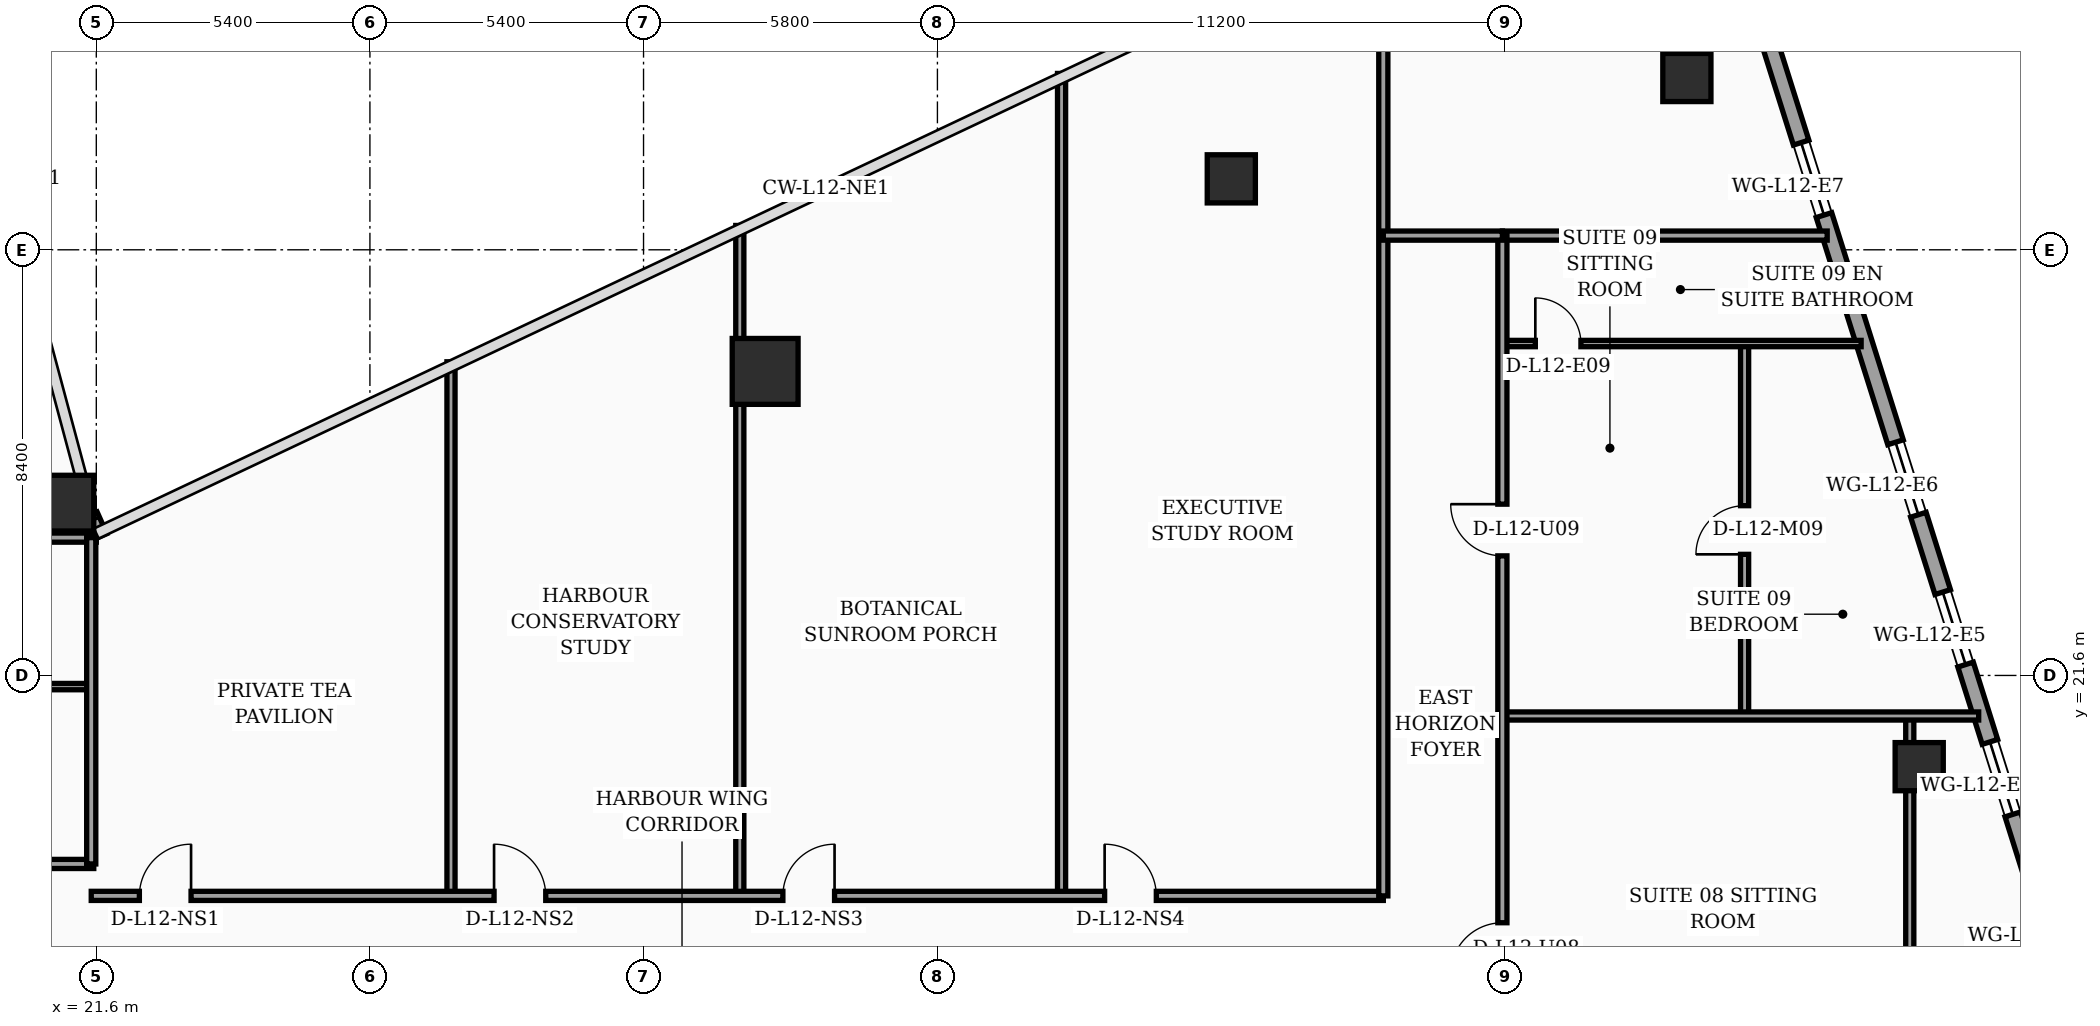
"""IFC4 building model, lengths in metres.
Left out: names, types, materials, properties, quantities, classifications, styles, units other than length and angle.
Written with IfcOpenShell. Run it as: python <this file> out.ifc"""

import sys

from ifc_helpers import new_model, si_unit, direction, frame, frame_2d, origin, origin_2d, place, context, subcontext, project, spatial, rectangle, hollow_rectangle, circle, extrude, element, fill, save


model = new_model("IFC4")
c1 = context("Model", 3, precision=1e-05, world=origin(), true_north=direction((0.0, 1.0)))
c2 = subcontext(c1, "Body", "Model", "MODEL_VIEW")
j1 = project(units=[si_unit("LENGTHUNIT", "METRE"), si_unit("PLANEANGLEUNIT", "RADIAN")], contexts=[c1])
p1 = place(None, origin())
s1 = spatial("IfcSite", under=j1, at=p1, CompositionType="ELEMENT")
p2 = place(p1, origin())
s2 = spatial("IfcBuilding", under=s1, at=p2, CompositionType="ELEMENT")
p3 = place(p2, frame((0.0, 0.0, 54.6)))
s3 = spatial("IfcBuildingStorey", under=s2, at=p3, CompositionType="ELEMENT", Elevation=54.6)
p4 = place(p3, frame((21.0, 25.0, 0.0), z_axis=(0.0, 0.0, 1.0), x_axis=(1.0, 0.0, 0.0)))
e1 = element("IfcColumn", 1, at=p4, inside=s3, PredefinedType="COLUMN", context=c2, shape_type="SweptSolid", body=[
    extrude(hollow_rectangle(XDim=1.1, YDim=1.1, WallThickness=0.045, at=origin_2d()), origin(), (0.0, 0.0, 1.0), 3.56),
])
p5 = place(p3, frame((34.8, 27.6, 0.0), z_axis=(0.0, 0.0, 1.0), x_axis=(1.0, 0.0, 0.0)))
e2 = element("IfcColumn", 2, at=p5, inside=s3, PredefinedType="COLUMN", context=c2, shape_type="SweptSolid", body=[
    extrude(circle(Radius=0.65, at=origin_2d()), origin(), (0.0, 0.0, 1.0), 3.56),
])
for number, where, z_axis, x_axis in (
    (3, (44.0, 31.4, 0.0), (0.0, 0.0, 1.0), (1.0, 0.0, 0.0)),
    (4, (57.576, 19.8, 0.0), (0.0, 0.0, 1.0), (1.0, 0.0, 0.0)),
    (5, (52.991, 33.4, 0.0), (0.0, 0.0, 1.0), (1.0, 0.0, 0.0)),
):
    element("IfcColumn", number, at=place(p3, frame(where, z_axis=z_axis, x_axis=x_axis)), inside=s3, PredefinedType="COLUMN", context=c2, shape_type="SweptSolid", body=[
        extrude(hollow_rectangle(XDim=0.95, YDim=0.95, WallThickness=0.04, at=origin_2d()), origin(), (0.0, 0.0, 1.0), 3.56),
    ])
p6 = place(p3, frame((21.68, 24.34, 0.0), z_axis=(0.0, 0.0, 1.0), x_axis=(-0.40758134973, 0.913168901875, 0.0)))
e6 = element("IfcWall", 6, at=p6, inside=s3, PredefinedType="SOLIDWALL", context=c2, shape_type="SweptSolid", body=[
    extrude(rectangle(XDim=0.471, YDim=0.28, at=frame_2d((0.235, 0.0))), origin(), (0.0, 0.0, 1.0), 3.56),
])
p7 = place(p3, frame((63.63, 5.505, 0.0), z_axis=(0.0, 0.0, 1.0), x_axis=(-0.300501856448, 0.953781229775, 0.0)))
e7 = element("IfcWall", 7, at=p7, inside=s3, PredefinedType="SOLIDWALL", context=c2, shape_type="SweptSolid", body=[
    extrude(rectangle(XDim=30.814, YDim=0.32, at=frame_2d((15.407, 0.0))), origin(), (0.0, 0.0, 1.0), 3.56),
])
p8 = place(p7, frame((4.747, 0.0, 0.0)))
e8 = element("IfcOpeningElement", 8, at=p8, cuts=e7, PredefinedType="OPENING", context=c2, shape_type="SweptSolid", body=[
    extrude(rectangle(XDim=1.4, YDim=2.25, at=frame_2d((0.7, 1.125))), frame((0.0, 0.17, 0.0), z_axis=(0.0, -1.0, 0.0), x_axis=(1.0, 0.0, 0.0)), (0.0, 0.0, 1.0), 0.34),
])
p9 = place(p7, frame((2.65, 0.0, 0.75)))
e9 = element("IfcOpeningElement", 9, at=p9, cuts=e7, PredefinedType="OPENING", context=c2, shape_type="SweptSolid", body=[
    extrude(rectangle(XDim=1.5, YDim=1.6, at=frame_2d((0.75, 0.8))), frame((0.0, 0.17, 0.0), z_axis=(0.0, -1.0, 0.0), x_axis=(1.0, 0.0, 0.0)), (0.0, 0.0, 1.0), 0.34),
])
p10 = place(p7, frame((7.8, 0.0, 0.75)))
e10 = element("IfcOpeningElement", 10, at=p10, cuts=e7, PredefinedType="OPENING", context=c2, shape_type="SweptSolid", body=[
    extrude(rectangle(XDim=1.5, YDim=1.6, at=frame_2d((0.75, 0.8))), frame((0.0, 0.17, 0.0), z_axis=(0.0, -1.0, 0.0), x_axis=(1.0, 0.0, 0.0)), (0.0, 0.0, 1.0), 0.34),
])
p11 = place(p7, frame((10.9, 0.0, 0.75)))
e11 = element("IfcOpeningElement", 11, at=p11, cuts=e7, PredefinedType="OPENING", context=c2, shape_type="SweptSolid", body=[
    extrude(rectangle(XDim=1.5, YDim=1.6, at=frame_2d((0.75, 0.8))), frame((0.0, 0.17, 0.0), z_axis=(0.0, -1.0, 0.0), x_axis=(1.0, 0.0, 0.0)), (0.0, 0.0, 1.0), 0.34),
])
p12 = place(p7, frame((14.0, 0.0, 0.75)))
e12 = element("IfcOpeningElement", 12, at=p12, cuts=e7, PredefinedType="OPENING", context=c2, shape_type="SweptSolid", body=[
    extrude(rectangle(XDim=1.5, YDim=1.6, at=frame_2d((0.75, 0.8))), frame((0.0, 0.17, 0.0), z_axis=(0.0, -1.0, 0.0), x_axis=(1.0, 0.0, 0.0)), (0.0, 0.0, 1.0), 0.34),
])
p13 = place(p7, frame((17.1, 0.0, 0.75)))
e13 = element("IfcOpeningElement", 13, at=p13, cuts=e7, PredefinedType="OPENING", context=c2, shape_type="SweptSolid", body=[
    extrude(rectangle(XDim=1.5, YDim=1.6, at=frame_2d((0.75, 0.8))), frame((0.0, 0.17, 0.0), z_axis=(0.0, -1.0, 0.0), x_axis=(1.0, 0.0, 0.0)), (0.0, 0.0, 1.0), 0.34),
])
p14 = place(p7, frame((20.2, 0.0, 0.75)))
e14 = element("IfcOpeningElement", 14, at=p14, cuts=e7, PredefinedType="OPENING", context=c2, shape_type="SweptSolid", body=[
    extrude(rectangle(XDim=1.5, YDim=1.6, at=frame_2d((0.75, 0.8))), frame((0.0, 0.17, 0.0), z_axis=(0.0, -1.0, 0.0), x_axis=(1.0, 0.0, 0.0)), (0.0, 0.0, 1.0), 0.34),
])
p15 = place(p7, frame((26.4, 0.0, 0.75)))
e15 = element("IfcOpeningElement", 15, at=p15, cuts=e7, PredefinedType="OPENING", context=c2, shape_type="SweptSolid", body=[
    extrude(rectangle(XDim=1.5, YDim=1.6, at=frame_2d((0.75, 0.8))), frame((0.0, 0.17, 0.0), z_axis=(0.0, -1.0, 0.0), x_axis=(1.0, 0.0, 0.0)), (0.0, 0.0, 1.0), 0.34),
])
p16 = place(p3, frame((17.65, 17.88, 0.0), z_axis=(0.0, 0.0, 1.0), x_axis=(1.0, 0.0, 0.0)))
e16 = element("IfcWall", 16, at=p16, inside=s3, PredefinedType="PARTITIONING", context=c2, shape_type="SweptSolid", body=[
    extrude(rectangle(XDim=3.9, YDim=0.18, at=frame_2d((1.95, 0.0))), origin(), (0.0, 0.0, 1.0), 3.09),
])
p17 = place(p3, frame((17.65, 21.38, 0.0), z_axis=(0.0, 0.0, 1.0), x_axis=(1.0, 0.0, 0.0)))
e17 = element("IfcWall", 17, at=p17, inside=s3, PredefinedType="PARTITIONING", context=c2, shape_type="SweptSolid", body=[
    extrude(rectangle(XDim=3.9, YDim=0.125, at=frame_2d((1.95, 0.0))), origin(), (0.0, 0.0, 1.0), 3.56),
])
p18 = place(p3, frame((17.65, 24.32, 0.0), z_axis=(0.0, 0.0, 1.0), x_axis=(1.0, 0.0, 0.0)))
e18 = element("IfcWall", 18, at=p18, inside=s3, PredefinedType="PARTITIONING", context=c2, shape_type="SweptSolid", body=[
    extrude(rectangle(XDim=3.95, YDim=0.18, at=frame_2d((1.975, 0.0))), origin(), (0.0, 0.0, 1.0), 3.56),
])
p19 = place(p3, frame((21.5, 17.88, 0.0), z_axis=(0.0, 0.0, 1.0), x_axis=(0.0, 1.0, 0.0)))
e19 = element("IfcWall", 19, at=p19, inside=s3, PredefinedType="PARTITIONING", context=c2, shape_type="SweptSolid", body=[
    extrude(rectangle(XDim=6.44, YDim=0.18, at=frame_2d((3.22, 0.0))), origin(), (0.0, 0.0, 1.0), 3.09),
])
p20 = place(p3, frame((28.6, 17.25, 0.0), z_axis=(0.0, 0.0, 1.0), x_axis=(0.0, 1.0, 0.0)))
e20 = element("IfcWall", 20, at=p20, inside=s3, PredefinedType="PARTITIONING", context=c2, shape_type="SweptSolid", body=[
    extrude(rectangle(XDim=10.54, YDim=0.16, at=frame_2d((5.27, 0.0))), origin(), (0.0, 0.0, 1.0), 2.84),
])
p21 = place(p3, frame((34.3, 17.25, 0.0), z_axis=(0.0, 0.0, 1.0), x_axis=(0.0, 1.0, 0.0)))
e21 = element("IfcWall", 21, at=p21, inside=s3, PredefinedType="PARTITIONING", context=c2, shape_type="SweptSolid", body=[
    extrude(rectangle(XDim=13.23, YDim=0.16, at=frame_2d((6.615, 0.0))), origin(), (0.0, 0.0, 1.0), 2.84),
])
p22 = place(p3, frame((40.65, 17.25, 0.0), z_axis=(0.0, 0.0, 1.0), x_axis=(0.0, 1.0, 0.0)))
e22 = element("IfcWall", 22, at=p22, inside=s3, PredefinedType="PARTITIONING", context=c2, shape_type="SweptSolid", body=[
    extrude(rectangle(XDim=16.23, YDim=0.16, at=frame_2d((8.115, 0.0))), origin(), (0.0, 0.0, 1.0), 2.84),
])
p23 = place(p3, frame((21.5, 17.25, 0.0), z_axis=(0.0, 0.0, 1.0), x_axis=(1.0, 0.0, 0.0)))
e23 = element("IfcWall", 23, at=p23, inside=s3, PredefinedType="PARTITIONING", context=c2, shape_type="SweptSolid", body=[
    extrude(rectangle(XDim=25.5, YDim=0.18, at=frame_2d((12.75, 0.0))), origin(), (0.0, 0.0, 1.0), 2.84),
])
p24 = place(p23, frame((0.95, 0.0, 0.0)))
e24 = element("IfcOpeningElement", 24, at=p24, cuts=e23, PredefinedType="OPENING", context=c2, shape_type="SweptSolid", body=[
    extrude(rectangle(XDim=1.02, YDim=2.2, at=frame_2d((0.51, 1.1))), frame((0.0, 0.1, 0.0), z_axis=(0.0, -1.0, 0.0), x_axis=(1.0, 0.0, 0.0)), (0.0, 0.0, 1.0), 0.2),
])
p25 = place(p23, frame((7.95, 0.0, 0.0)))
e25 = element("IfcOpeningElement", 25, at=p25, cuts=e23, PredefinedType="OPENING", context=c2, shape_type="SweptSolid", body=[
    extrude(rectangle(XDim=1.02, YDim=2.2, at=frame_2d((0.51, 1.1))), frame((0.0, 0.1, 0.0), z_axis=(0.0, -1.0, 0.0), x_axis=(1.0, 0.0, 0.0)), (0.0, 0.0, 1.0), 0.2),
])
p26 = place(p23, frame((13.65, 0.0, 0.0)))
e26 = element("IfcOpeningElement", 26, at=p26, cuts=e23, PredefinedType="OPENING", context=c2, shape_type="SweptSolid", body=[
    extrude(rectangle(XDim=1.02, YDim=2.2, at=frame_2d((0.51, 1.1))), frame((0.0, 0.1, 0.0), z_axis=(0.0, -1.0, 0.0), x_axis=(1.0, 0.0, 0.0)), (0.0, 0.0, 1.0), 0.2),
])
p27 = place(p23, frame((20.0, 0.0, 0.0)))
e27 = element("IfcOpeningElement", 27, at=p27, cuts=e23, PredefinedType="OPENING", context=c2, shape_type="SweptSolid", body=[
    extrude(rectangle(XDim=1.02, YDim=2.2, at=frame_2d((0.51, 1.1))), frame((0.0, 0.1, 0.0), z_axis=(0.0, -1.0, 0.0), x_axis=(1.0, 0.0, 0.0)), (0.0, 0.0, 1.0), 0.2),
])
p28 = place(p3, frame((47.0, 17.25, 0.0), z_axis=(0.0, 0.0, 1.0), x_axis=(0.0, 1.0, 0.0)))
e28 = element("IfcWall", 28, at=p28, inside=s3, PredefinedType="PARTITIONING", context=c2, shape_type="SweptSolid", body=[
    extrude(rectangle(XDim=19.22, YDim=0.18, at=frame_2d((9.61, 0.0))), origin(), (0.0, 0.0, 1.0), 2.84),
])
p29 = place(p3, frame((57.39, 7.45, 0.0), z_axis=(0.0, 0.0, 1.0), x_axis=(0.0, 1.0, 0.0)))
e29 = element("IfcWall", 29, at=p29, inside=s3, PredefinedType="PARTITIONING", context=c2, shape_type="SweptSolid", body=[
    extrude(rectangle(XDim=13.35, YDim=0.16, at=frame_2d((6.675, 0.0))), origin(), (0.0, 0.0, 1.0), 2.84),
])
p30 = place(p29, frame((6.2, 0.0, 0.0)))
e30 = element("IfcOpeningElement", 30, at=p30, cuts=e29, PredefinedType="OPENING", context=c2, shape_type="SweptSolid", body=[
    extrude(rectangle(XDim=0.96, YDim=2.2, at=frame_2d((0.48, 1.1))), frame((0.0, 0.09, 0.0), z_axis=(0.0, -1.0, 0.0), x_axis=(1.0, 0.0, 0.0)), (0.0, 0.0, 1.0), 0.18),
])
p31 = place(p3, frame((54.13, 20.8, 0.0), z_axis=(0.0, 0.0, 1.0), x_axis=(0.0, 1.0, 0.0)))
e31 = element("IfcWall", 31, at=p31, inside=s3, PredefinedType="PARTITIONING", context=c2, shape_type="SweptSolid", body=[
    extrude(rectangle(XDim=7.35, YDim=0.16, at=frame_2d((3.675, 0.0))), origin(), (0.0, 0.0, 1.0), 3.19),
])
p32 = place(p31, frame((3.19, 0.0, 0.0)))
e32 = element("IfcOpeningElement", 32, at=p32, cuts=e31, PredefinedType="OPENING", context=c2, shape_type="SweptSolid", body=[
    extrude(rectangle(XDim=0.96, YDim=2.2, at=frame_2d((0.48, 1.1))), frame((0.0, 0.09, 0.0), z_axis=(0.0, -1.0, 0.0), x_axis=(1.0, 0.0, 0.0)), (0.0, 0.0, 1.0), 0.18),
])
p33 = place(p3, frame((49.35, 28.15, 0.0), z_axis=(0.0, 0.0, 1.0), x_axis=(1.0, 0.0, 0.0)))
e33 = element("IfcWall", 33, at=p33, inside=s3, PredefinedType="PARTITIONING", context=c2, shape_type="SweptSolid", body=[
    extrude(rectangle(XDim=7.08, YDim=0.125, at=frame_2d((3.54, 0.0))), origin(), (0.0, 0.0, 1.0), 3.04),
])
p34 = place(p33, frame((0.65, 0.0, 0.0)))
e34 = element("IfcOpeningElement", 34, at=p34, cuts=e33, PredefinedType="OPENING", context=c2, shape_type="SweptSolid", body=[
    extrude(rectangle(XDim=0.9, YDim=2.15, at=frame_2d((0.45, 1.075))), frame((0.0, 0.073, 0.0), z_axis=(0.0, -1.0, 0.0), x_axis=(1.0, 0.0, 0.0)), (0.0, 0.0, 1.0), 0.145),
])
p35 = place(p3, frame((49.35, 20.8, 0.0), z_axis=(0.0, 0.0, 1.0), x_axis=(1.0, 0.0, 0.0)))
e35 = element("IfcWall", 35, at=p35, inside=s3, PredefinedType="PARTITIONING", context=c2, shape_type="SweptSolid", body=[
    extrude(rectangle(XDim=9.4, YDim=0.16, at=frame_2d((4.7, 0.0))), origin(), (0.0, 0.0, 1.0), 3.04),
])
p36 = place(p3, frame((49.35, 30.28, 0.0), z_axis=(0.0, 0.0, 1.0), x_axis=(1.0, 0.0, 0.0)))
e36 = element("IfcWall", 36, at=p36, inside=s3, PredefinedType="PARTITIONING", context=c2, shape_type="SweptSolid", body=[
    extrude(rectangle(XDim=6.41, YDim=0.18, at=frame_2d((3.205, 0.0))), origin(), (0.0, 0.0, 1.0), 2.84),
])
p37 = place(p3, frame((49.35, 2.44, 0.0), z_axis=(0.0, 0.0, 1.0), x_axis=(0.0, 1.0, 0.0)))
e37 = element("IfcWall", 37, at=p37, inside=s3, PredefinedType="PARTITIONING", context=c2, shape_type="SweptSolid", body=[
    extrude(rectangle(XDim=27.84, YDim=0.18, at=frame_2d((13.92, 0.0))), origin(), (0.0, 0.0, 1.0), 2.84),
])
p38 = place(p37, frame((13.26, 0.0, 0.0)))
e38 = element("IfcOpeningElement", 38, at=p38, cuts=e37, PredefinedType="OPENING", context=c2, shape_type="SweptSolid", body=[
    extrude(rectangle(XDim=1.02, YDim=2.2, at=frame_2d((0.51, 1.1))), frame((0.0, 0.1, 0.0), z_axis=(0.0, -1.0, 0.0), x_axis=(1.0, 0.0, 0.0)), (0.0, 0.0, 1.0), 0.2),
])
p39 = place(p37, frame((21.52, 0.0, 0.0)))
e39 = element("IfcOpeningElement", 39, at=p39, cuts=e37, PredefinedType="OPENING", context=c2, shape_type="SweptSolid", body=[
    extrude(rectangle(XDim=1.02, YDim=2.2, at=frame_2d((0.51, 1.1))), frame((0.0, 0.1, 0.0), z_axis=(0.0, -1.0, 0.0), x_axis=(1.0, 0.0, 0.0)), (0.0, 0.0, 1.0), 0.2),
])
p40 = place(p3, frame((47.0, 30.28, 0.0), z_axis=(0.0, 0.0, 1.0), x_axis=(1.0, 0.0, 0.0)))
e40 = element("IfcWall", 40, at=p40, inside=s3, PredefinedType="PARTITIONING", context=c2, shape_type="SweptSolid", body=[
    extrude(rectangle(XDim=2.35, YDim=0.18, at=frame_2d((1.175, 0.0))), origin(), (0.0, 0.0, 1.0), 2.84),
])
p41 = place(p12, origin())
e41 = element("IfcWindow", 41, at=p41, inside=s3, PartitioningType="SINGLE_PANEL", PredefinedType="WINDOW", context=c2, shape_type="SweptSolid", body=[
    extrude(rectangle(XDim=1.5, YDim=1.6, at=frame_2d((0.75, 0.8))), frame((0.0, 0.03, 0.0), z_axis=(0.0, -1.0, 0.0), x_axis=(1.0, 0.0, 0.0)), (0.0, 0.0, 1.0), 0.06),
])
fill(e12, e41)
p42 = place(p13, origin())
e42 = element("IfcWindow", 42, at=p42, inside=s3, PartitioningType="SINGLE_PANEL", PredefinedType="WINDOW", context=c2, shape_type="SweptSolid", body=[
    extrude(rectangle(XDim=1.5, YDim=1.6, at=frame_2d((0.75, 0.8))), frame((0.0, 0.03, 0.0), z_axis=(0.0, -1.0, 0.0), x_axis=(1.0, 0.0, 0.0)), (0.0, 0.0, 1.0), 0.06),
])
fill(e13, e42)
p43 = place(p14, origin())
e43 = element("IfcWindow", 43, at=p43, inside=s3, PartitioningType="SINGLE_PANEL", PredefinedType="WINDOW", context=c2, shape_type="SweptSolid", body=[
    extrude(rectangle(XDim=1.5, YDim=1.6, at=frame_2d((0.75, 0.8))), frame((0.0, 0.03, 0.0), z_axis=(0.0, -1.0, 0.0), x_axis=(1.0, 0.0, 0.0)), (0.0, 0.0, 1.0), 0.06),
])
fill(e14, e43)
p44 = place(p15, origin())
e44 = element("IfcWindow", 44, at=p44, inside=s3, PartitioningType="SINGLE_PANEL", PredefinedType="WINDOW", context=c2, shape_type="SweptSolid", body=[
    extrude(rectangle(XDim=1.5, YDim=1.6, at=frame_2d((0.75, 0.8))), frame((0.0, 0.03, 0.0), z_axis=(0.0, -1.0, 0.0), x_axis=(1.0, 0.0, 0.0)), (0.0, 0.0, 1.0), 0.06),
])
fill(e15, e44)
p45 = place(p24, origin())
e45 = element("IfcDoor", 45, at=p45, inside=s3, OperationType="SINGLE_SWING_RIGHT", PredefinedType="DOOR", context=c2, shape_type="SweptSolid", body=[
    extrude(rectangle(XDim=1.02, YDim=2.2, at=frame_2d((0.51, 1.1))), frame((0.0, 0.025, 0.0), z_axis=(0.0, -1.0, 0.0), x_axis=(1.0, 0.0, 0.0)), (0.0, 0.0, 1.0), 0.05),
])
fill(e24, e45)
p46 = place(p25, origin())
e46 = element("IfcDoor", 46, at=p46, inside=s3, OperationType="SINGLE_SWING_LEFT", PredefinedType="DOOR", context=c2, shape_type="SweptSolid", body=[
    extrude(rectangle(XDim=1.02, YDim=2.2, at=frame_2d((0.51, 1.1))), frame((0.0, 0.025, 0.0), z_axis=(0.0, -1.0, 0.0), x_axis=(1.0, 0.0, 0.0)), (0.0, 0.0, 1.0), 0.05),
])
fill(e25, e46)
p47 = place(p26, origin())
e47 = element("IfcDoor", 47, at=p47, inside=s3, OperationType="SINGLE_SWING_RIGHT", PredefinedType="DOOR", context=c2, shape_type="SweptSolid", body=[
    extrude(rectangle(XDim=1.02, YDim=2.2, at=frame_2d((0.51, 1.1))), frame((0.0, 0.025, 0.0), z_axis=(0.0, -1.0, 0.0), x_axis=(1.0, 0.0, 0.0)), (0.0, 0.0, 1.0), 0.05),
])
fill(e26, e47)
p48 = place(p27, origin())
e48 = element("IfcDoor", 48, at=p48, inside=s3, OperationType="SINGLE_SWING_LEFT", PredefinedType="DOOR", context=c2, shape_type="SweptSolid", body=[
    extrude(rectangle(XDim=1.02, YDim=2.2, at=frame_2d((0.51, 1.1))), frame((0.0, 0.025, 0.0), z_axis=(0.0, -1.0, 0.0), x_axis=(1.0, 0.0, 0.0)), (0.0, 0.0, 1.0), 0.05),
])
fill(e27, e48)
p49 = place(p32, origin())
e49 = element("IfcDoor", 49, at=p49, inside=s3, OperationType="SINGLE_SWING_LEFT", PredefinedType="DOOR", context=c2, shape_type="SweptSolid", body=[
    extrude(rectangle(XDim=0.96, YDim=2.2, at=frame_2d((0.48, 1.1))), frame((0.0, 0.025, 0.0), z_axis=(0.0, -1.0, 0.0), x_axis=(1.0, 0.0, 0.0)), (0.0, 0.0, 1.0), 0.05),
])
fill(e32, e49)
p50 = place(p34, origin())
e50 = element("IfcDoor", 50, at=p50, inside=s3, OperationType="SINGLE_SWING_LEFT", PredefinedType="DOOR", context=c2, shape_type="SweptSolid", body=[
    extrude(rectangle(XDim=0.9, YDim=2.15, at=frame_2d((0.45, 1.075))), frame((0.0, 0.025, 0.0), z_axis=(0.0, -1.0, 0.0), x_axis=(1.0, 0.0, 0.0)), (0.0, 0.0, 1.0), 0.05),
])
fill(e34, e50)
p51 = place(p38, origin())
e51 = element("IfcDoor", 51, at=p51, inside=s3, OperationType="SINGLE_SWING_LEFT", PredefinedType="DOOR", context=c2, shape_type="SweptSolid", body=[
    extrude(rectangle(XDim=1.02, YDim=2.2, at=frame_2d((0.51, 1.1))), frame((0.0, 0.025, 0.0), z_axis=(0.0, -1.0, 0.0), x_axis=(1.0, 0.0, 0.0)), (0.0, 0.0, 1.0), 0.05),
])
fill(e38, e51)
p52 = place(p39, origin())
e52 = element("IfcDoor", 52, at=p52, inside=s3, OperationType="SINGLE_SWING_RIGHT", PredefinedType="DOOR", context=c2, shape_type="SweptSolid", body=[
    extrude(rectangle(XDim=1.02, YDim=2.2, at=frame_2d((0.51, 1.1))), frame((0.0, 0.025, 0.0), z_axis=(0.0, -1.0, 0.0), x_axis=(1.0, 0.0, 0.0)), (0.0, 0.0, 1.0), 0.05),
])
fill(e39, e52)
save(model, sys.argv[1])
